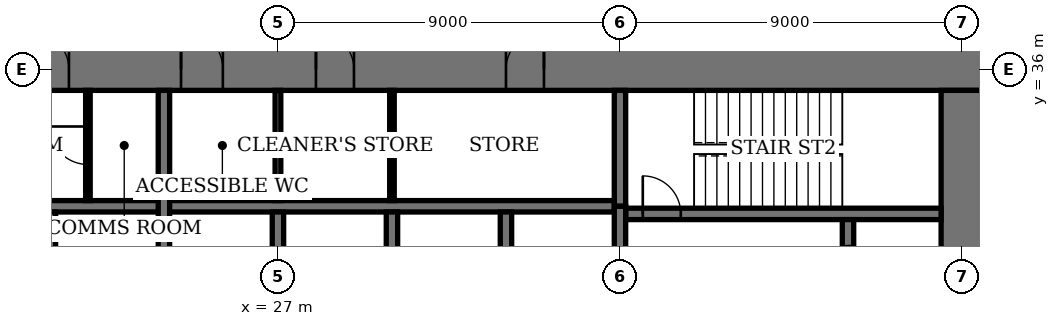
"""IFC4 building model, lengths in metres.
Left out: names, types, materials, properties, quantities, classifications, styles, units other than length and angle.
Written with IfcOpenShell. Run it as: python <this file> out.ifc"""

import sys

from ifc_helpers import new_model, si_unit, direction, frame, frame_2d, origin, place, context, subcontext, project, spatial, rectangle, extrude, element, fill, save


model = new_model("IFC4")
c1 = context("Model", 3, precision=1e-05, world=origin(), true_north=direction((0.0, 1.0)))
c2 = subcontext(c1, "Body", "Model", "MODEL_VIEW")
j1 = project(units=[si_unit("LENGTHUNIT", "METRE"), si_unit("PLANEANGLEUNIT", "RADIAN")], contexts=[c1])
p1 = place(None, origin())
s1 = spatial("IfcSite", under=j1, at=p1, CompositionType="ELEMENT")
p2 = place(p1, origin())
s2 = spatial("IfcBuilding", under=s1, at=p2, CompositionType="ELEMENT")
p3 = place(p2, frame((0.0, 0.0, 93.0)))
s3 = spatial("IfcBuildingStorey", under=s2, at=p3, CompositionType="ELEMENT", Elevation=93.0)
p4 = place(p3, frame((45.55, 36.0, 0.0), z_axis=(0.0, 0.0, 1.0), x_axis=(-1.0, 0.0, 0.0)))
e1 = element("IfcWall", 1, at=p4, inside=s3, PredefinedType="SHEAR", context=c2, shape_type="SweptSolid", body=[
    extrude(rectangle(XDim=28.1, YDim=1.1, at=frame_2d((14.05, 0.0))), origin(), (0.0, 0.0, 1.0), 4.0),
])
p5 = place(p4, frame((11.55, 0.0, 0.0)))
e2 = element("IfcOpeningElement", 2, at=p5, cuts=e1, PredefinedType="OPENING", context=c2, shape_type="SweptSolid", body=[
    extrude(rectangle(XDim=1.0, YDim=2.4, at=frame_2d((0.5, 1.2))), frame((0.0, 0.56, 0.0), z_axis=(0.0, -1.0, 0.0), x_axis=(1.0, 0.0, 0.0)), (0.0, 0.0, 1.0), 1.12),
])
p6 = place(p4, frame((16.55, 0.0, 0.0)))
e3 = element("IfcOpeningElement", 3, at=p6, cuts=e1, PredefinedType="OPENING", context=c2, shape_type="SweptSolid", body=[
    extrude(rectangle(XDim=1.0, YDim=2.4, at=frame_2d((0.5, 1.2))), frame((0.0, 0.56, 0.0), z_axis=(0.0, -1.0, 0.0), x_axis=(1.0, 0.0, 0.0)), (0.0, 0.0, 1.0), 1.12),
])
p7 = place(p4, frame((20.0, 0.0, 0.0)))
e4 = element("IfcOpeningElement", 4, at=p7, cuts=e1, PredefinedType="OPENING", context=c2, shape_type="SweptSolid", body=[
    extrude(rectangle(XDim=1.1, YDim=2.4, at=frame_2d((0.55, 1.2))), frame((0.0, 0.56, 0.0), z_axis=(0.0, -1.0, 0.0), x_axis=(1.0, 0.0, 0.0)), (0.0, 0.0, 1.0), 1.12),
])
p8 = place(p4, frame((24.05, 0.0, 0.0)))
e5 = element("IfcOpeningElement", 5, at=p8, cuts=e1, PredefinedType="OPENING", context=c2, shape_type="SweptSolid", body=[
    extrude(rectangle(XDim=1.0, YDim=2.4, at=frame_2d((0.5, 1.2))), frame((0.0, 0.56, 0.0), z_axis=(0.0, -1.0, 0.0), x_axis=(1.0, 0.0, 0.0)), (0.0, 0.0, 1.0), 1.12),
])
p9 = place(p3, frame((45.0, 18.55, 0.0), z_axis=(0.0, 0.0, 1.0), x_axis=(0.0, 1.0, 0.0)))
e6 = element("IfcWall", 6, at=p9, inside=s3, PredefinedType="SHEAR", context=c2, shape_type="SweptSolid", body=[
    extrude(rectangle(XDim=16.9, YDim=1.1, at=frame_2d((8.45, 0.0))), origin(), (0.0, 0.0, 1.0), 4.0),
])
p10 = place(p9, frame((8.45, 0.0, 0.0)))
e7 = element("IfcOpeningElement", 7, at=p10, cuts=e6, PredefinedType="OPENING", context=c2, shape_type="SweptSolid", body=[
    extrude(rectangle(XDim=1.8, YDim=2.4, at=frame_2d((0.9, 1.2))), frame((0.0, 0.56, 0.0), z_axis=(0.0, -1.0, 0.0), x_axis=(1.0, 0.0, 0.0)), (0.0, 0.0, 1.0), 1.12),
])
p11 = place(p3, frame((36.15, 32.2, 0.0), z_axis=(0.0, 0.0, 1.0), x_axis=(1.0, 0.0, 0.0)))
e8 = element("IfcWall", 8, at=p11, inside=s3, PredefinedType="SHEAR", context=c2, shape_type="SweptSolid", body=[
    extrude(rectangle(XDim=8.3, YDim=0.3, at=frame_2d((4.15, 0.0))), origin(), (0.0, 0.0, 1.0), 4.0),
])
p12 = place(p11, frame((0.45, 0.0, 0.0)))
e9 = element("IfcOpeningElement", 9, at=p12, cuts=e8, PredefinedType="OPENING", context=c2, shape_type="SweptSolid", body=[
    extrude(rectangle(XDim=1.0, YDim=2.4, at=frame_2d((0.5, 1.2))), frame((0.0, 0.16, 0.0), z_axis=(0.0, -1.0, 0.0), x_axis=(1.0, 0.0, 0.0)), (0.0, 0.0, 1.0), 0.32),
])
p13 = place(p3, frame((36.0, 32.4, 0.0), z_axis=(0.0, 0.0, 1.0), x_axis=(0.0, 1.0, 0.0)))
e10 = element("IfcWall", 10, at=p13, inside=s3, PredefinedType="SHEAR", context=c2, shape_type="SweptSolid", body=[
    extrude(rectangle(XDim=3.05, YDim=0.3, at=frame_2d((1.525, 0.0))), origin(), (0.0, 0.0, 1.0), 4.0),
])
p14 = place(p3, frame((42.0, 29.55, 0.0), z_axis=(0.0, 0.0, 1.0), x_axis=(0.0, 1.0, 0.0)))
e11 = element("IfcWall", 11, at=p14, inside=s3, PredefinedType="SHEAR", context=c2, shape_type="SweptSolid", body=[
    extrude(rectangle(XDim=2.5, YDim=0.3, at=frame_2d((1.25, 0.0))), origin(), (0.0, 0.0, 1.0), 4.0),
])
p15 = place(p14, frame((0.7, 0.0, 0.0)))
e12 = element("IfcOpeningElement", 12, at=p15, cuts=e11, PredefinedType="OPENING", context=c2, shape_type="SweptSolid", body=[
    extrude(rectangle(XDim=1.1, YDim=2.4, at=frame_2d((0.55, 1.2))), frame((0.0, 0.16, 0.0), z_axis=(0.0, -1.0, 0.0), x_axis=(1.0, 0.0, 0.0)), (0.0, 0.0, 1.0), 0.32),
])
p16 = place(p3, frame((18.55, 32.4, 0.0), z_axis=(0.0, 0.0, 1.0), x_axis=(1.0, 0.0, 0.0)))
e13 = element("IfcWall", 13, at=p16, inside=s3, PredefinedType="SHEAR", context=c2, shape_type="SweptSolid", body=[
    extrude(rectangle(XDim=17.3, YDim=0.3, at=frame_2d((8.65, 0.0))), origin(), (0.0, 0.0, 1.0), 4.0),
])
for number, where, z_axis, x_axis in (
    (14, (33.0, 29.55, 0.0), (0.0, 0.0, 1.0), (0.0, 1.0, 0.0)),
    (15, (30.0, 29.55, 0.0), (0.0, 0.0, 1.0), (0.0, 1.0, 0.0)),
    (16, (27.0, 29.55, 0.0), (0.0, 0.0, 1.0), (0.0, 1.0, 0.0)),
):
    element("IfcWall", number, at=place(p3, frame(where, z_axis=z_axis, x_axis=x_axis)), inside=s3, PredefinedType="SHEAR", context=c2, shape_type="SweptSolid", body=[
        extrude(rectangle(XDim=2.7, YDim=0.3, at=frame_2d((1.35, 0.0))), origin(), (0.0, 0.0, 1.0), 4.0),
    ])
p17 = place(p3, frame((24.0, 29.55, 0.0), z_axis=(0.0, 0.0, 1.0), x_axis=(0.0, 1.0, 0.0)))
e17 = element("IfcWall", 17, at=p17, inside=s3, PredefinedType="SHEAR", context=c2, shape_type="SweptSolid", body=[
    extrude(rectangle(XDim=5.9, YDim=0.3, at=frame_2d((2.95, 0.0))), origin(), (0.0, 0.0, 1.0), 4.0),
])
p18 = place(p3, frame((21.0, 29.55, 0.0), z_axis=(0.0, 0.0, 1.0), x_axis=(0.0, 1.0, 0.0)))
e18 = element("IfcWall", 18, at=p18, inside=s3, PredefinedType="SHEAR", context=c2, shape_type="SweptSolid", body=[
    extrude(rectangle(XDim=2.7, YDim=0.3, at=frame_2d((1.35, 0.0))), origin(), (0.0, 0.0, 1.0), 4.0),
])
p19 = place(p3, frame((36.0, 29.55, 0.0), z_axis=(0.0, 0.0, 1.0), x_axis=(0.0, 1.0, 0.0)))
e19 = element("IfcWall", 19, at=p19, inside=s3, PredefinedType="SHEAR", context=c2, shape_type="SweptSolid", body=[
    extrude(rectangle(XDim=2.85, YDim=0.3, at=frame_2d((1.425, 0.0))), origin(), (0.0, 0.0, 1.0), 4.0),
])
p20 = place(p3, frame((30.0, 32.55, 0.0), z_axis=(0.0, 0.0, 1.0), x_axis=(0.0, 1.0, 0.0)))
e20 = element("IfcWall", 20, at=p20, inside=s3, PredefinedType="PARTITIONING", context=c2, shape_type="SweptSolid", body=[
    extrude(rectangle(XDim=2.9, YDim=0.12, at=frame_2d((1.45, 0.0))), origin(), (0.0, 0.0, 1.0), 3.75),
])
p21 = place(p3, frame((27.0, 32.55, 0.0), z_axis=(0.0, 0.0, 1.0), x_axis=(0.0, 1.0, 0.0)))
e21 = element("IfcWall", 21, at=p21, inside=s3, PredefinedType="PARTITIONING", context=c2, shape_type="SweptSolid", body=[
    extrude(rectangle(XDim=2.9, YDim=0.15, at=frame_2d((1.45, 0.0))), origin(), (0.0, 0.0, 1.0), 3.75),
])
p22 = place(p3, frame((22.0, 32.55, 0.0), z_axis=(0.0, 0.0, 1.0), x_axis=(0.0, 1.0, 0.0)))
e22 = element("IfcWall", 22, at=p22, inside=s3, PredefinedType="PARTITIONING", context=c2, shape_type="SweptSolid", body=[
    extrude(rectangle(XDim=2.9, YDim=0.12, at=frame_2d((1.45, 0.0))), origin(), (0.0, 0.0, 1.0), 3.75),
])
p23 = place(p22, frame((0.95, 0.0, 0.0)))
e23 = element("IfcOpeningElement", 23, at=p23, cuts=e22, PredefinedType="OPENING", context=c2, shape_type="SweptSolid", body=[
    extrude(rectangle(XDim=1.0, YDim=2.4, at=frame_2d((0.5, 1.2))), frame((0.0, 0.07, 0.0), z_axis=(0.0, -1.0, 0.0), x_axis=(1.0, 0.0, 0.0)), (0.0, 0.0, 1.0), 0.14),
])
p24 = place(p5, origin())
e24 = element("IfcDoor", 24, at=p24, inside=s3, OperationType="SINGLE_SWING_LEFT", PredefinedType="DOOR", context=c2, shape_type="SweptSolid", body=[
    extrude(rectangle(XDim=1.0, YDim=2.4, at=frame_2d((0.5, 1.2))), frame((0.0, 0.025, 0.0), z_axis=(0.0, -1.0, 0.0), x_axis=(1.0, 0.0, 0.0)), (0.0, 0.0, 1.0), 0.05),
    extrude(rectangle(XDim=0.04, YDim=2.4, at=frame_2d((0.02, 1.2))), frame((0.0, 0.4, 0.0), z_axis=(0.0, -1.0, 0.0), x_axis=(1.0, 0.0, 0.0)), (0.0, 0.0, 1.0), 0.8),
    extrude(rectangle(XDim=0.04, YDim=2.4, at=frame_2d((0.98, 1.2))), frame((0.0, 0.4, 0.0), z_axis=(0.0, -1.0, 0.0), x_axis=(1.0, 0.0, 0.0)), (0.0, 0.0, 1.0), 0.8),
    extrude(rectangle(XDim=1.0, YDim=0.04, at=frame_2d((0.5, 2.38))), frame((0.0, 0.4, 0.0), z_axis=(0.0, -1.0, 0.0), x_axis=(1.0, 0.0, 0.0)), (0.0, 0.0, 1.0), 0.8),
])
fill(e2, e24)
p25 = place(p6, origin())
e25 = element("IfcDoor", 25, at=p25, inside=s3, OperationType="SINGLE_SWING_RIGHT", PredefinedType="DOOR", context=c2, shape_type="SweptSolid", body=[
    extrude(rectangle(XDim=1.0, YDim=2.4, at=frame_2d((0.5, 1.2))), frame((0.0, 0.025, 0.0), z_axis=(0.0, -1.0, 0.0), x_axis=(1.0, 0.0, 0.0)), (0.0, 0.0, 1.0), 0.05),
    extrude(rectangle(XDim=0.04, YDim=2.4, at=frame_2d((0.02, 1.2))), frame((0.0, 0.4, 0.0), z_axis=(0.0, -1.0, 0.0), x_axis=(1.0, 0.0, 0.0)), (0.0, 0.0, 1.0), 0.8),
    extrude(rectangle(XDim=0.04, YDim=2.4, at=frame_2d((0.98, 1.2))), frame((0.0, 0.4, 0.0), z_axis=(0.0, -1.0, 0.0), x_axis=(1.0, 0.0, 0.0)), (0.0, 0.0, 1.0), 0.8),
    extrude(rectangle(XDim=1.0, YDim=0.04, at=frame_2d((0.5, 2.38))), frame((0.0, 0.4, 0.0), z_axis=(0.0, -1.0, 0.0), x_axis=(1.0, 0.0, 0.0)), (0.0, 0.0, 1.0), 0.8),
])
fill(e3, e25)
p26 = place(p7, origin())
e26 = element("IfcDoor", 26, at=p26, inside=s3, OperationType="SINGLE_SWING_RIGHT", PredefinedType="DOOR", context=c2, shape_type="SweptSolid", body=[
    extrude(rectangle(XDim=1.1, YDim=2.4, at=frame_2d((0.55, 1.2))), frame((0.0, 0.025, 0.0), z_axis=(0.0, -1.0, 0.0), x_axis=(1.0, 0.0, 0.0)), (0.0, 0.0, 1.0), 0.05),
    extrude(rectangle(XDim=0.04, YDim=2.4, at=frame_2d((0.02, 1.2))), frame((0.0, 0.44, 0.0), z_axis=(0.0, -1.0, 0.0), x_axis=(1.0, 0.0, 0.0)), (0.0, 0.0, 1.0), 0.88),
    extrude(rectangle(XDim=0.04, YDim=2.4, at=frame_2d((1.08, 1.2))), frame((0.0, 0.44, 0.0), z_axis=(0.0, -1.0, 0.0), x_axis=(1.0, 0.0, 0.0)), (0.0, 0.0, 1.0), 0.88),
    extrude(rectangle(XDim=1.1, YDim=0.04, at=frame_2d((0.55, 2.38))), frame((0.0, 0.44, 0.0), z_axis=(0.0, -1.0, 0.0), x_axis=(1.0, 0.0, 0.0)), (0.0, 0.0, 1.0), 0.88),
])
fill(e4, e26)
p27 = place(p8, origin())
e27 = element("IfcDoor", 27, at=p27, inside=s3, OperationType="SINGLE_SWING_RIGHT", PredefinedType="DOOR", context=c2, shape_type="SweptSolid", body=[
    extrude(rectangle(XDim=1.0, YDim=2.4, at=frame_2d((0.5, 1.2))), frame((0.0, 0.025, 0.0), z_axis=(0.0, -1.0, 0.0), x_axis=(1.0, 0.0, 0.0)), (0.0, 0.0, 1.0), 0.05),
    extrude(rectangle(XDim=0.04, YDim=2.4, at=frame_2d((0.02, 1.2))), frame((0.0, 0.4, 0.0), z_axis=(0.0, -1.0, 0.0), x_axis=(1.0, 0.0, 0.0)), (0.0, 0.0, 1.0), 0.8),
    extrude(rectangle(XDim=0.04, YDim=2.4, at=frame_2d((0.98, 1.2))), frame((0.0, 0.4, 0.0), z_axis=(0.0, -1.0, 0.0), x_axis=(1.0, 0.0, 0.0)), (0.0, 0.0, 1.0), 0.8),
    extrude(rectangle(XDim=1.0, YDim=0.04, at=frame_2d((0.5, 2.38))), frame((0.0, 0.4, 0.0), z_axis=(0.0, -1.0, 0.0), x_axis=(1.0, 0.0, 0.0)), (0.0, 0.0, 1.0), 0.8),
])
fill(e5, e27)
p28 = place(p12, origin())
e28 = element("IfcDoor", 28, at=p28, inside=s3, OperationType="SINGLE_SWING_RIGHT", PredefinedType="DOOR", context=c2, shape_type="SweptSolid", body=[
    extrude(rectangle(XDim=1.0, YDim=2.4, at=frame_2d((0.5, 1.2))), frame((0.0, 0.03, 0.0), z_axis=(0.0, -1.0, 0.0), x_axis=(1.0, 0.0, 0.0)), (0.0, 0.0, 1.0), 0.06),
])
fill(e9, e28)
p29 = place(p23, origin())
e29 = element("IfcDoor", 29, at=p29, inside=s3, OperationType="SINGLE_SWING_LEFT", PredefinedType="DOOR", context=c2, shape_type="SweptSolid", body=[
    extrude(rectangle(XDim=1.0, YDim=2.4, at=frame_2d((0.5, 1.2))), frame((0.0, 0.03, 0.0), z_axis=(0.0, -1.0, 0.0), x_axis=(1.0, 0.0, 0.0)), (0.0, 0.0, 1.0), 0.06),
])
fill(e23, e29)
save(model, sys.argv[1])
